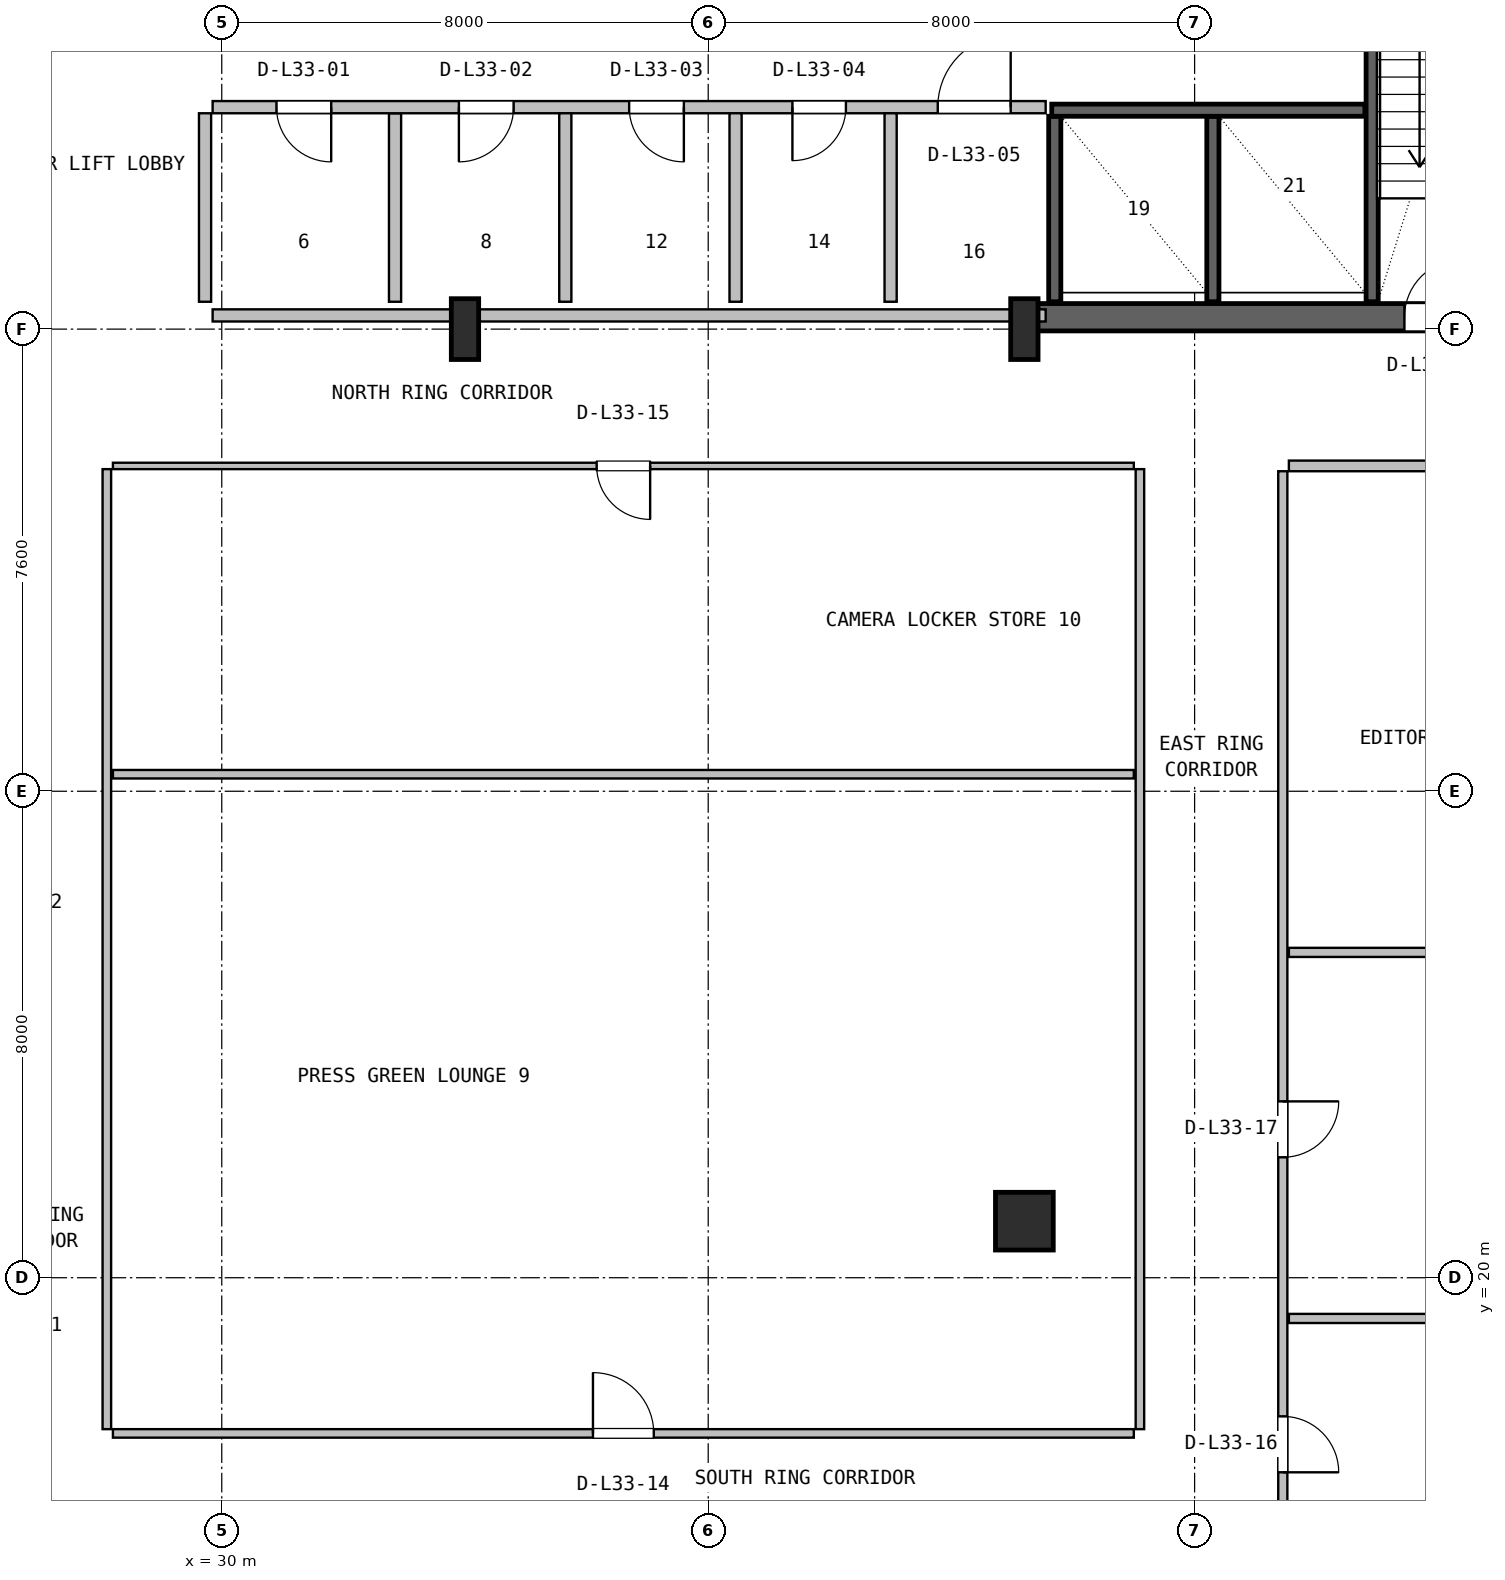
"""IFC4 building model, lengths in metres.
Left out: names, types, materials, properties, quantities, classifications, styles, units other than length and angle.
Written with IfcOpenShell. Run it as: python <this file> out.ifc"""

import sys

from ifc_helpers import new_model, si_unit, direction, frame, frame_2d, origin, origin_2d, place, context, subcontext, project, spatial, rectangle, i_section, extrude, source, transform, mapped, element, fill, save


model = new_model("IFC4")
c1 = context("Model", 3, precision=1e-05, world=origin(), true_north=direction((0.0, 1.0)))
c2 = subcontext(c1, "Body", "Model", "MODEL_VIEW")
j1 = project(units=[si_unit("LENGTHUNIT", "METRE"), si_unit("PLANEANGLEUNIT", "RADIAN")], contexts=[c1])
p1 = place(None, origin())
s1 = spatial("IfcSite", under=j1, at=p1, CompositionType="ELEMENT")
p2 = place(p1, origin())
s2 = spatial("IfcBuilding", under=s1, at=p2, CompositionType="ELEMENT")
p3 = place(p2, frame((0.0, 0.0, 137.2)))
s3 = spatial("IfcBuildingStorey", under=s2, at=p3, CompositionType="ELEMENT", Elevation=137.2)
p4 = place(p3, frame((43.2, 35.795, 0.0), z_axis=(0.0, 0.0, 1.0), x_axis=(1.0, 0.0, 0.0)))
e1 = element("IfcWall", 1, at=p4, inside=s3, PredefinedType="SHEAR", context=c2, shape_type="SweptSolid", body=[
    extrude(rectangle(XDim=9.23, YDim=0.45, at=frame_2d((4.615, 0.0))), origin(), (0.0, 0.0, 1.0), 3.48),
])
p5 = place(p4, frame((6.25, 0.0, 0.0)))
e2 = element("IfcOpeningElement", 2, at=p5, cuts=e1, PredefinedType="OPENING", context=c2, shape_type="SweptSolid", body=[
    extrude(rectangle(XDim=0.95, YDim=2.1, at=frame_2d((0.475, 1.05))), frame((0.0, 0.235, 0.0), z_axis=(0.0, -1.0, 0.0), x_axis=(1.0, 0.0, 0.0)), (0.0, 0.0, 1.0), 0.47),
])
m1 = source(origin(), c2, "Body", "SweptSolid", [
    extrude(i_section(OverallWidth=0.45, OverallDepth=1.0, WebThickness=0.016, FlangeThickness=0.03, FilletRadius=0.016, at=origin_2d()), origin(), (0.0, 0.0, 1.0), 3.8),
])
for number, where, z_axis, x_axis in (
    (3, (34.0, 35.6, 0.0), (0.0, 0.0, 1.0), (1.0, 0.0, 0.0)),
    (4, (43.2, 35.6, 0.0), (0.0, 0.0, 1.0), (1.0, 0.0, 0.0)),
):
    element("IfcColumn", number, at=place(p3, frame(where, z_axis=z_axis, x_axis=x_axis)), inside=s3, PredefinedType="COLUMN", context=c2, shape_type="MappedRepresentation", body=[
        mapped(m1, transform((0.0, 0.0, 0.0), x_axis=(1.0, 0.0, 0.0), y_axis=(0.0, 1.0, 0.0), z_axis=(0.0, 0.0, 1.0), scale=1.0)),
    ])
m2 = source(origin(), c2, "Body", "SweptSolid", [
    extrude(rectangle(XDim=0.95, YDim=0.95, at=origin_2d()), origin(), (0.0, 0.0, 1.0), 3.8),
])
p6 = place(p3, frame((43.2, 20.93, 0.0), z_axis=(0.0, 0.0, 1.0), x_axis=(1.0, 0.0, 0.0)))
e5 = element("IfcColumn", 5, at=p6, inside=s3, PredefinedType="COLUMN", context=c2, shape_type="MappedRepresentation", body=[
    mapped(m2, transform((0.0, 0.0, 0.0), x_axis=(1.0, 0.0, 0.0), y_axis=(0.0, 1.0, 0.0), z_axis=(0.0, 0.0, 1.0), scale=1.0)),
])
p7 = place(p3, frame((48.92, 36.05, 0.0), z_axis=(0.0, 0.0, 1.0), x_axis=(0.0, 1.0, 0.0)))
e6 = element("IfcWall", 6, at=p7, inside=s3, PredefinedType="SHEAR", context=c2, shape_type="SweptSolid", body=[
    extrude(rectangle(XDim=10.5, YDim=0.2, at=frame_2d((5.25, 0.0))), origin(), (0.0, 0.0, 1.0), 3.48),
])
for number, where, z_axis, x_axis in (
    (7, (43.7, 36.05, 0.0), (0.0, 0.0, 1.0), (0.0, 1.0, 0.0)),
    (8, (46.3, 36.05, 0.0), (0.0, 0.0, 1.0), (0.0, 1.0, 0.0)),
):
    element("IfcWall", number, at=place(p3, frame(where, z_axis=z_axis, x_axis=x_axis)), inside=s3, PredefinedType="SHEAR", context=c2, shape_type="SweptSolid", body=[
        extrude(rectangle(XDim=3.05, YDim=0.2, at=frame_2d((1.525, 0.0))), origin(), (0.0, 0.0, 1.0), 3.48),
    ])
p8 = place(p3, frame((43.65, 39.2, 0.0), z_axis=(0.0, 0.0, 1.0), x_axis=(1.0, 0.0, 0.0)))
e9 = element("IfcWall", 9, at=p8, inside=s3, PredefinedType="SHEAR", context=c2, shape_type="SweptSolid", body=[
    extrude(rectangle(XDim=5.15, YDim=0.2, at=frame_2d((2.575, 0.0))), origin(), (0.0, 0.0, 1.0), 3.48),
])
p9 = place(p3, frame((29.85, 35.825, 0.0), z_axis=(0.0, 0.0, 1.0), x_axis=(1.0, 0.0, 0.0)))
e10 = element("IfcWall", 10, at=p9, inside=s3, PredefinedType="SOLIDWALL", context=c2, shape_type="SweptSolid", body=[
    extrude(rectangle(XDim=13.7, YDim=0.2, at=frame_2d((6.85, 0.0))), origin(), (0.0, 0.0, 1.0), 2.255),
])
p10 = place(p3, frame((32.85, 36.05, 0.0), z_axis=(0.0, 0.0, 1.0), x_axis=(0.0, 1.0, 0.0)))
e11 = element("IfcWall", 11, at=p10, inside=s3, PredefinedType="PLUMBINGWALL", context=c2, shape_type="SweptSolid", body=[
    extrude(rectangle(XDim=3.1, YDim=0.2, at=frame_2d((1.55, 0.0))), origin(), (0.0, 0.0, 1.0), 3.46),
])
p11 = place(p3, frame((29.85, 39.25, 0.0), z_axis=(0.0, 0.0, 1.0), x_axis=(1.0, 0.0, 0.0)))
e12 = element("IfcWall", 12, at=p11, inside=s3, PredefinedType="SOLIDWALL", context=c2, shape_type="SweptSolid", body=[
    extrude(rectangle(XDim=13.7, YDim=0.2, at=frame_2d((6.85, 0.0))), origin(), (0.0, 0.0, 1.0), 3.46),
])
p12 = place(p11, frame((1.05, 0.0, 0.0)))
e13 = element("IfcOpeningElement", 13, at=p12, cuts=e12, PredefinedType="OPENING", context=c2, shape_type="SweptSolid", body=[
    extrude(rectangle(XDim=0.9, YDim=2.06, at=frame_2d((0.45, 1.03))), frame((0.0, 0.11, 0.0), z_axis=(0.0, -1.0, 0.0), x_axis=(1.0, 0.0, 0.0)), (0.0, 0.0, 1.0), 0.22),
])
p13 = place(p11, frame((4.05, 0.0, 0.0)))
e14 = element("IfcOpeningElement", 14, at=p13, cuts=e12, PredefinedType="OPENING", context=c2, shape_type="SweptSolid", body=[
    extrude(rectangle(XDim=0.9, YDim=2.06, at=frame_2d((0.45, 1.03))), frame((0.0, 0.11, 0.0), z_axis=(0.0, -1.0, 0.0), x_axis=(1.0, 0.0, 0.0)), (0.0, 0.0, 1.0), 0.22),
])
p14 = place(p11, frame((6.85, 0.0, 0.0)))
e15 = element("IfcOpeningElement", 15, at=p14, cuts=e12, PredefinedType="OPENING", context=c2, shape_type="SweptSolid", body=[
    extrude(rectangle(XDim=0.9, YDim=2.06, at=frame_2d((0.45, 1.03))), frame((0.0, 0.11, 0.0), z_axis=(0.0, -1.0, 0.0), x_axis=(1.0, 0.0, 0.0)), (0.0, 0.0, 1.0), 0.22),
])
p15 = place(p11, frame((9.535, 0.0, 0.0)))
e16 = element("IfcOpeningElement", 16, at=p15, cuts=e12, PredefinedType="OPENING", context=c2, shape_type="SweptSolid", body=[
    extrude(rectangle(XDim=0.88, YDim=2.06, at=frame_2d((0.44, 1.03))), frame((0.0, 0.11, 0.0), z_axis=(0.0, -1.0, 0.0), x_axis=(1.0, 0.0, 0.0)), (0.0, 0.0, 1.0), 0.22),
])
p16 = place(p11, frame((11.925, 0.0, 0.0)))
e17 = element("IfcOpeningElement", 17, at=p16, cuts=e12, PredefinedType="OPENING", context=c2, shape_type="SweptSolid", body=[
    extrude(rectangle(XDim=1.2, YDim=2.1, at=frame_2d((0.6, 1.05))), frame((0.0, 0.11, 0.0), z_axis=(0.0, -1.0, 0.0), x_axis=(1.0, 0.0, 0.0)), (0.0, 0.0, 1.0), 0.22),
])
for number, where, z_axis, x_axis in (
    (18, (29.725, 36.05, 0.0), (0.0, 0.0, 1.0), (0.0, 1.0, 0.0)),
    (19, (35.65, 36.05, 0.0), (0.0, 0.0, 1.0), (0.0, 1.0, 0.0)),
    (20, (38.45, 36.05, 0.0), (0.0, 0.0, 1.0), (0.0, 1.0, 0.0)),
):
    element("IfcWall", number, at=place(p3, frame(where, z_axis=z_axis, x_axis=x_axis)), inside=s3, PredefinedType="PLUMBINGWALL", context=c2, shape_type="SweptSolid", body=[
        extrude(rectangle(XDim=3.1, YDim=0.2, at=frame_2d((1.55, 0.0))), origin(), (0.0, 0.0, 1.0), 3.46),
    ])
p17 = place(p3, frame((41.0, 36.05, 0.0), z_axis=(0.0, 0.0, 1.0), x_axis=(0.0, 1.0, 0.0)))
e21 = element("IfcWall", 21, at=p17, inside=s3, PredefinedType="SOLIDWALL", context=c2, shape_type="SweptSolid", body=[
    extrude(rectangle(XDim=3.1, YDim=0.2, at=frame_2d((1.55, 0.0))), origin(), (0.0, 0.0, 1.0), 3.46),
])
p18 = place(p3, frame((28.21, 17.44, 0.0), z_axis=(0.0, 0.0, 1.0), x_axis=(1.0, 0.0, 0.0)))
e22 = element("IfcWall", 22, at=p18, inside=s3, PredefinedType="PARTITIONING", context=c2, shape_type="SweptSolid", body=[
    extrude(rectangle(XDim=16.79, YDim=0.14, at=frame_2d((8.395, 0.0))), origin(), (0.0, 0.0, 1.0), 2.76),
])
p19 = place(p18, frame((7.895, 0.0, 0.0)))
e23 = element("IfcOpeningElement", 23, at=p19, cuts=e22, PredefinedType="OPENING", context=c2, shape_type="SweptSolid", body=[
    extrude(rectangle(XDim=1.0, YDim=2.1, at=frame_2d((0.5, 1.05))), frame((0.0, 0.08, 0.0), z_axis=(0.0, -1.0, 0.0), x_axis=(1.0, 0.0, 0.0)), (0.0, 0.0, 1.0), 0.16),
])
p20 = place(p3, frame((45.1, 17.51, 0.0), z_axis=(0.0, 0.0, 1.0), x_axis=(0.0, 1.0, 0.0)))
e24 = element("IfcWall", 24, at=p20, inside=s3, PredefinedType="PARTITIONING", context=c2, shape_type="SweptSolid", body=[
    extrude(rectangle(XDim=15.787, YDim=0.14, at=frame_2d((7.894, 0.0))), origin(), (0.0, 0.0, 1.0), 3.152),
])
p21 = place(p3, frame((28.21, 28.28, 0.0), z_axis=(0.0, 0.0, 1.0), x_axis=(1.0, 0.0, 0.0)))
e25 = element("IfcWall", 25, at=p21, inside=s3, PredefinedType="PARTITIONING", context=c2, shape_type="SweptSolid", body=[
    extrude(rectangle(XDim=16.79, YDim=0.14, at=frame_2d((8.395, 0.0))), origin(), (0.0, 0.0, 1.0), 2.76),
])
p22 = place(p3, frame((28.11, 17.51, 0.0), z_axis=(0.0, 0.0, 1.0), x_axis=(0.0, 1.0, 0.0)))
e26 = element("IfcWall", 26, at=p22, inside=s3, PredefinedType="PARTITIONING", context=c2, shape_type="SweptSolid", body=[
    extrude(rectangle(XDim=15.787, YDim=0.14, at=frame_2d((7.894, 0.0))), origin(), (0.0, 0.0, 1.0), 2.76),
])
p23 = place(p3, frame((28.21, 33.35, 0.0), z_axis=(0.0, 0.0, 1.0), x_axis=(1.0, 0.0, 0.0)))
e27 = element("IfcWall", 27, at=p23, inside=s3, PredefinedType="PARTITIONING", context=c2, shape_type="SweptSolid", body=[
    extrude(rectangle(XDim=16.79, YDim=0.105, at=frame_2d((8.395, 0.0))), origin(), (0.0, 0.0, 1.0), 2.76),
])
p24 = place(p23, frame((7.955, 0.0, 0.0)))
e28 = element("IfcOpeningElement", 28, at=p24, cuts=e27, PredefinedType="OPENING", context=c2, shape_type="SweptSolid", body=[
    extrude(rectangle(XDim=0.88, YDim=2.06, at=frame_2d((0.44, 1.03))), frame((0.0, 0.062, 0.0), z_axis=(0.0, -1.0, 0.0), x_axis=(1.0, 0.0, 0.0)), (0.0, 0.0, 1.0), 0.125),
])
p25 = place(p3, frame((47.55, 19.33, 0.0), z_axis=(0.0, 0.0, 1.0), x_axis=(1.0, 0.0, 0.0)))
e29 = element("IfcWall", 29, at=p25, inside=s3, PredefinedType="PARTITIONING", context=c2, shape_type="SweptSolid", body=[
    extrude(rectangle(XDim=15.77, YDim=0.15, at=frame_2d((7.885, 0.0))), origin(), (0.0, 0.0, 1.0), 3.038),
])
p26 = place(p3, frame((47.45, 15.178, 0.0), z_axis=(0.0, 0.0, 1.0), x_axis=(0.0, 1.0, 0.0)))
e30 = element("IfcWall", 30, at=p26, inside=s3, PredefinedType="PARTITIONING", context=c2, shape_type="SweptSolid", body=[
    extrude(rectangle(XDim=18.085, YDim=0.15, at=frame_2d((9.042, 0.0))), origin(), (0.0, 0.0, 1.0), 3.152),
])
p27 = place(p26, frame((1.622, 0.0, 0.0)))
e31 = element("IfcOpeningElement", 31, at=p27, cuts=e30, PredefinedType="OPENING", context=c2, shape_type="SweptSolid", body=[
    extrude(rectangle(XDim=0.92, YDim=2.08, at=frame_2d((0.46, 1.04))), frame((0.0, 0.085, 0.0), z_axis=(0.0, -1.0, 0.0), x_axis=(1.0, 0.0, 0.0)), (0.0, 0.0, 1.0), 0.17),
])
p28 = place(p26, frame((6.802, 0.0, 0.0)))
e32 = element("IfcOpeningElement", 32, at=p28, cuts=e30, PredefinedType="OPENING", context=c2, shape_type="SweptSolid", body=[
    extrude(rectangle(XDim=0.92, YDim=2.08, at=frame_2d((0.46, 1.04))), frame((0.0, 0.085, 0.0), z_axis=(0.0, -1.0, 0.0), x_axis=(1.0, 0.0, 0.0)), (0.0, 0.0, 1.0), 0.17),
])
p29 = place(p3, frame((47.55, 25.35, 0.0), z_axis=(0.0, 0.0, 1.0), x_axis=(1.0, 0.0, 0.0)))
e33 = element("IfcWall", 33, at=p29, inside=s3, PredefinedType="PARTITIONING", context=c2, shape_type="SweptSolid", body=[
    extrude(rectangle(XDim=15.77, YDim=0.15, at=frame_2d((7.885, 0.0))), origin(), (0.0, 0.0, 1.0), 3.038),
])
p30 = place(p3, frame((47.55, 33.35, 0.0), z_axis=(0.0, 0.0, 1.0), x_axis=(1.0, 0.0, 0.0)))
e34 = element("IfcWall", 34, at=p30, inside=s3, PredefinedType="PARTITIONING", context=c2, shape_type="SweptSolid", body=[
    extrude(rectangle(XDim=15.77, YDim=0.175, at=frame_2d((7.885, 0.0))), origin(), (0.0, 0.0, 1.0), 3.038),
])
p31 = place(p30, frame((5.425, 0.0, 0.0)))
e35 = element("IfcOpeningElement", 35, at=p31, cuts=e34, PredefinedType="OPENING", context=c2, shape_type="SweptSolid", body=[
    extrude(rectangle(XDim=1.05, YDim=2.1, at=frame_2d((0.525, 1.05))), frame((0.0, 0.098, 0.0), z_axis=(0.0, -1.0, 0.0), x_axis=(1.0, 0.0, 0.0)), (0.0, 0.0, 1.0), 0.195),
])
m3 = source(origin(), c2, "Body", "SweptSolid", [
    extrude(rectangle(XDim=0.95, YDim=2.1, at=frame_2d((0.475, 1.05))), frame((0.0, 0.025, 0.0), z_axis=(0.0, -1.0, 0.0), x_axis=(1.0, 0.0, 0.0)), (0.0, 0.0, 1.0), 0.05),
])
p32 = place(p5, origin())
e36 = element("IfcDoor", 36, at=p32, inside=s3, OperationType="SINGLE_SWING_RIGHT", PredefinedType="DOOR", context=c2, shape_type="MappedRepresentation", body=[
    mapped(m3, transform((0.0, 0.0, 0.0), x_axis=(1.0, 0.0, 0.0), y_axis=(0.0, 1.0, 0.0), z_axis=(0.0, 0.0, 1.0), scale=1.0)),
])
fill(e2, e36)
m4 = source(origin(), c2, "Body", "SweptSolid", [
    extrude(rectangle(XDim=0.9, YDim=2.06, at=frame_2d((0.45, 1.03))), frame((0.0, 0.025, 0.0), z_axis=(0.0, -1.0, 0.0), x_axis=(1.0, 0.0, 0.0)), (0.0, 0.0, 1.0), 0.05),
])
p33 = place(p12, frame((0.9, 0.0, 0.0), z_axis=(0.0, 0.0, 1.0), x_axis=(-1.0, 0.0, 0.0)))
e37 = element("IfcDoor", 37, at=p33, inside=s3, OperationType="SINGLE_SWING_RIGHT", PredefinedType="DOOR", context=c2, shape_type="MappedRepresentation", body=[
    mapped(m4, transform((0.0, 0.0, 0.0), x_axis=(1.0, 0.0, 0.0), y_axis=(0.0, 1.0, 0.0), z_axis=(0.0, 0.0, 1.0), scale=1.0)),
])
fill(e13, e37)
p34 = place(p13, frame((0.9, 0.0, 0.0), z_axis=(0.0, 0.0, 1.0), x_axis=(-1.0, 0.0, 0.0)))
e38 = element("IfcDoor", 38, at=p34, inside=s3, OperationType="SINGLE_SWING_LEFT", PredefinedType="DOOR", context=c2, shape_type="MappedRepresentation", body=[
    mapped(m4, transform((0.0, 0.0, 0.0), x_axis=(1.0, 0.0, 0.0), y_axis=(0.0, 1.0, 0.0), z_axis=(0.0, 0.0, 1.0), scale=1.0)),
])
fill(e14, e38)
p35 = place(p14, frame((0.9, 0.0, 0.0), z_axis=(0.0, 0.0, 1.0), x_axis=(-1.0, 0.0, 0.0)))
e39 = element("IfcDoor", 39, at=p35, inside=s3, OperationType="SINGLE_SWING_RIGHT", PredefinedType="DOOR", context=c2, shape_type="MappedRepresentation", body=[
    mapped(m4, transform((0.0, 0.0, 0.0), x_axis=(1.0, 0.0, 0.0), y_axis=(0.0, 1.0, 0.0), z_axis=(0.0, 0.0, 1.0), scale=1.0)),
])
fill(e15, e39)
m5 = source(origin(), c2, "Body", "SweptSolid", [
    extrude(rectangle(XDim=0.88, YDim=2.06, at=frame_2d((0.44, 1.03))), frame((0.0, 0.025, 0.0), z_axis=(0.0, -1.0, 0.0), x_axis=(1.0, 0.0, 0.0)), (0.0, 0.0, 1.0), 0.05),
])
p36 = place(p15, frame((0.88, 0.0, 0.0), z_axis=(0.0, 0.0, 1.0), x_axis=(-1.0, 0.0, 0.0)))
e40 = element("IfcDoor", 40, at=p36, inside=s3, OperationType="SINGLE_SWING_LEFT", PredefinedType="DOOR", context=c2, shape_type="MappedRepresentation", body=[
    mapped(m5, transform((0.0, 0.0, 0.0), x_axis=(1.0, 0.0, 0.0), y_axis=(0.0, 1.0, 0.0), z_axis=(0.0, 0.0, 1.0), scale=1.0)),
])
fill(e16, e40)
m6 = source(origin(), c2, "Body", "SweptSolid", [
    extrude(rectangle(XDim=1.2, YDim=2.1, at=frame_2d((0.6, 1.05))), frame((0.0, 0.025, 0.0), z_axis=(0.0, -1.0, 0.0), x_axis=(1.0, 0.0, 0.0)), (0.0, 0.0, 1.0), 0.05),
])
p37 = place(p16, origin())
e41 = element("IfcDoor", 41, at=p37, inside=s3, OperationType="SINGLE_SWING_RIGHT", PredefinedType="DOOR", context=c2, shape_type="MappedRepresentation", body=[
    mapped(m6, transform((0.0, 0.0, 0.0), x_axis=(1.0, 0.0, 0.0), y_axis=(0.0, 1.0, 0.0), z_axis=(0.0, 0.0, 1.0), scale=1.0)),
])
fill(e17, e41)
m7 = source(origin(), c2, "Body", "SweptSolid", [
    extrude(rectangle(XDim=1.0, YDim=2.1, at=frame_2d((0.5, 1.05))), frame((0.0, 0.025, 0.0), z_axis=(0.0, -1.0, 0.0), x_axis=(1.0, 0.0, 0.0)), (0.0, 0.0, 1.0), 0.05),
])
p38 = place(p19, origin())
e42 = element("IfcDoor", 42, at=p38, inside=s3, OperationType="SINGLE_SWING_LEFT", PredefinedType="DOOR", context=c2, shape_type="MappedRepresentation", body=[
    mapped(m7, transform((0.0, 0.0, 0.0), x_axis=(1.0, 0.0, 0.0), y_axis=(0.0, 1.0, 0.0), z_axis=(0.0, 0.0, 1.0), scale=1.0)),
])
fill(e23, e42)
p39 = place(p24, frame((0.88, 0.0, 0.0), z_axis=(0.0, 0.0, 1.0), x_axis=(-1.0, 0.0, 0.0)))
e43 = element("IfcDoor", 43, at=p39, inside=s3, OperationType="SINGLE_SWING_RIGHT", PredefinedType="DOOR", context=c2, shape_type="MappedRepresentation", body=[
    mapped(m5, transform((0.0, 0.0, 0.0), x_axis=(1.0, 0.0, 0.0), y_axis=(0.0, 1.0, 0.0), z_axis=(0.0, 0.0, 1.0), scale=1.0)),
])
fill(e28, e43)
m8 = source(origin(), c2, "Body", "SweptSolid", [
    extrude(rectangle(XDim=0.92, YDim=2.08, at=frame_2d((0.46, 1.04))), frame((0.0, 0.025, 0.0), z_axis=(0.0, -1.0, 0.0), x_axis=(1.0, 0.0, 0.0)), (0.0, 0.0, 1.0), 0.05),
])
p40 = place(p27, frame((0.92, 0.0, 0.0), z_axis=(0.0, 0.0, 1.0), x_axis=(-1.0, 0.0, 0.0)))
e44 = element("IfcDoor", 44, at=p40, inside=s3, OperationType="SINGLE_SWING_LEFT", PredefinedType="DOOR", context=c2, shape_type="MappedRepresentation", body=[
    mapped(m8, transform((0.0, 0.0, 0.0), x_axis=(1.0, 0.0, 0.0), y_axis=(0.0, 1.0, 0.0), z_axis=(0.0, 0.0, 1.0), scale=1.0)),
])
fill(e31, e44)
p41 = place(p28, frame((0.92, 0.0, 0.0), z_axis=(0.0, 0.0, 1.0), x_axis=(-1.0, 0.0, 0.0)))
e45 = element("IfcDoor", 45, at=p41, inside=s3, OperationType="SINGLE_SWING_RIGHT", PredefinedType="DOOR", context=c2, shape_type="MappedRepresentation", body=[
    mapped(m8, transform((0.0, 0.0, 0.0), x_axis=(1.0, 0.0, 0.0), y_axis=(0.0, 1.0, 0.0), z_axis=(0.0, 0.0, 1.0), scale=1.0)),
])
fill(e32, e45)
save(model, sys.argv[1])
